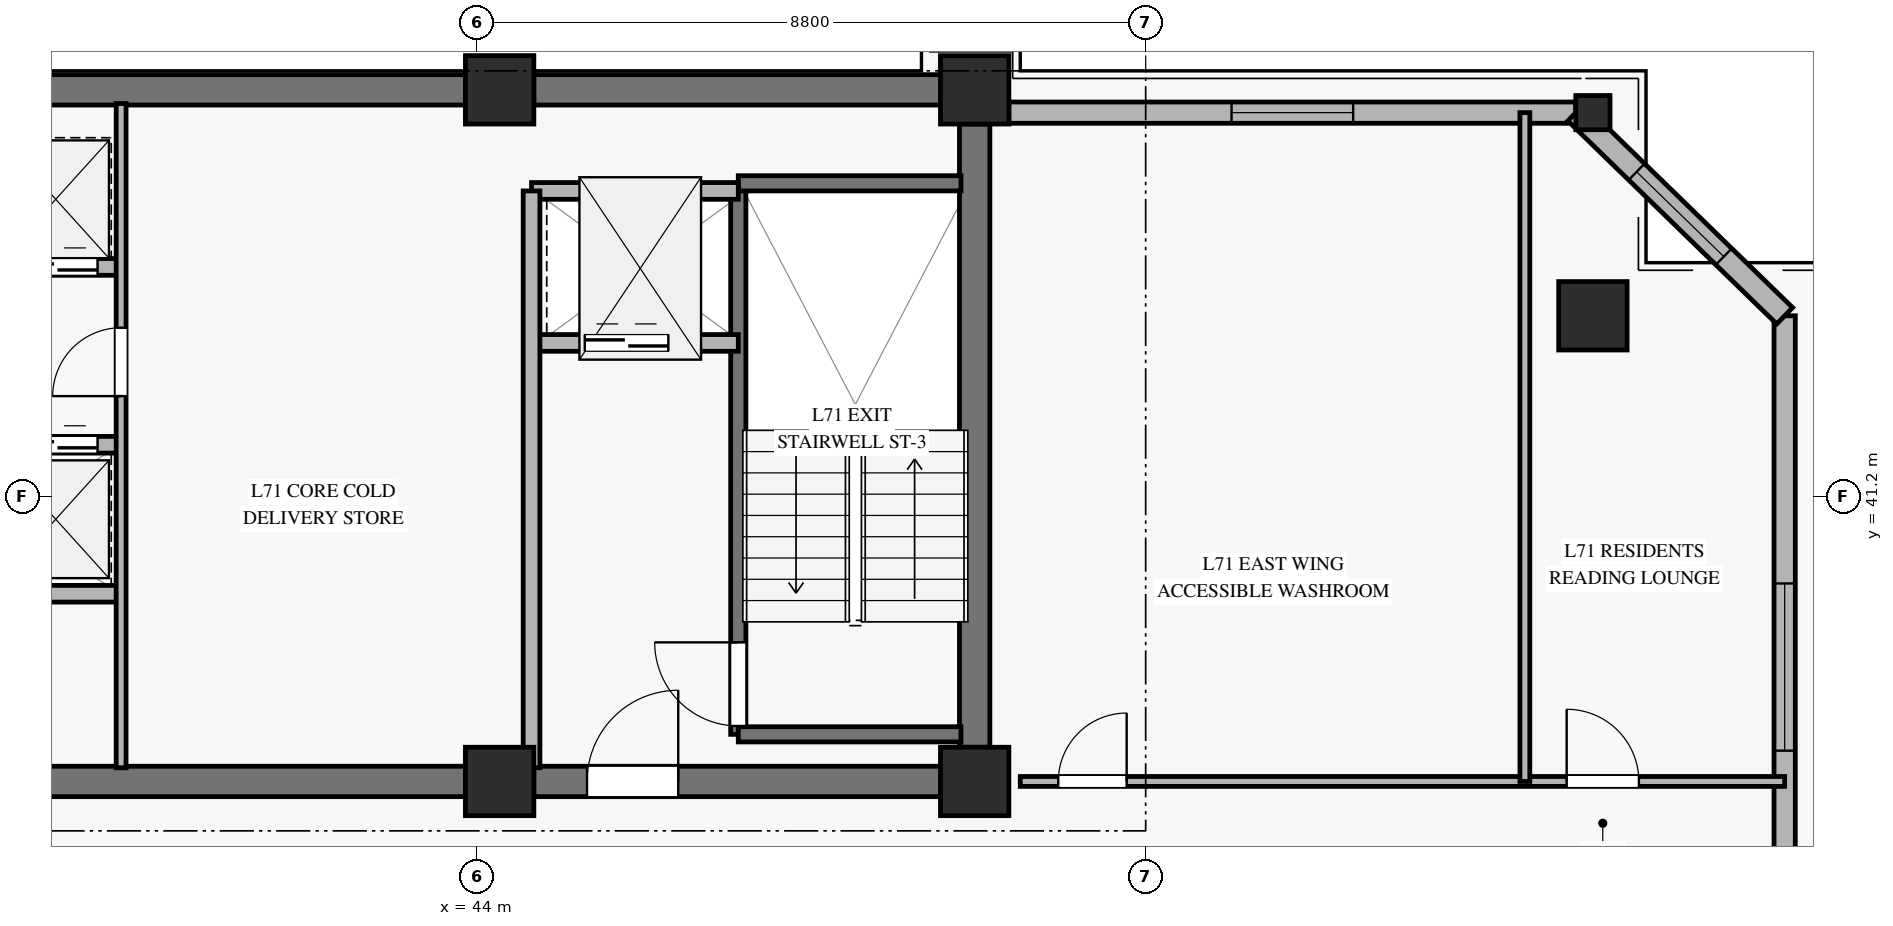
"""IFC4 building model, lengths in metres.
Left out: names, types, materials, properties, quantities, classifications, styles, units other than length and angle.
Written with IfcOpenShell. Run it as: python <this file> out.ifc"""

import sys

from ifc_helpers import new_model, si_unit, direction, frame, frame_2d, origin, origin_2d, place, context, subcontext, project, spatial, rectangle, hollow_rectangle, extrude, source, transform, mapped, element, fill, save


model = new_model("IFC4")
c1 = context("Model", 3, precision=1e-05, world=origin(), true_north=direction((0.0, 1.0)))
c2 = subcontext(c1, "Body", "Model", "MODEL_VIEW")
j1 = project(units=[si_unit("LENGTHUNIT", "METRE"), si_unit("PLANEANGLEUNIT", "RADIAN")], contexts=[c1])
p1 = place(None, origin())
s1 = spatial("IfcSite", under=j1, at=p1, CompositionType="ELEMENT")
p2 = place(p1, origin())
s2 = spatial("IfcBuilding", under=s1, at=p2, CompositionType="ELEMENT")
p3 = place(p2, frame((0.0, 0.0, 275.7)))
s3 = spatial("IfcBuildingStorey", under=s2, at=p3, CompositionType="ELEMENT", Elevation=275.7)
m1 = source(origin(), c2, "Body", "SweptSolid", [
    extrude(rectangle(XDim=0.9, YDim=0.9, at=origin_2d()), origin(), (0.0, 0.0, 1.0), 3.14),
])
for number, where, z_axis, x_axis in (
    (1, (44.3, 37.45, 0.0), (0.0, 0.0, 1.0), (1.0, 0.0, 0.0)),
    (2, (44.3, 46.55, 0.0), (0.0, 0.0, 1.0), (1.0, 0.0, 0.0)),
    (3, (50.55, 37.45, 0.0), (0.0, 0.0, 1.0), (1.0, 0.0, 0.0)),
    (4, (50.55, 46.55, 0.0), (0.0, 0.0, 1.0), (1.0, 0.0, 0.0)),
):
    element("IfcColumn", number, at=place(p3, frame(where, z_axis=z_axis, x_axis=x_axis)), inside=s3, PredefinedType="PILASTER", context=c2, shape_type="MappedRepresentation", body=[
        mapped(m1, transform((0.0, 0.0, 0.0), x_axis=(1.0, 0.0, 0.0), y_axis=(0.0, 1.0, 0.0), z_axis=(0.0, 0.0, 1.0), scale=1.0)),
    ])
p4 = place(p3, frame((36.05, 46.55, 0.0), z_axis=(0.0, 0.0, 1.0), x_axis=(1.0, 0.0, 0.0)))
e5 = element("IfcWall", 5, at=p4, inside=s3, PredefinedType="SHEAR", context=c2, shape_type="SweptSolid", body=[
    extrude(rectangle(XDim=7.8, YDim=0.4, at=frame_2d((3.9, 0.0))), origin(), (0.0, 0.0, 1.0), 3.14),
])
p5 = place(p3, frame((44.75, 46.55, 0.0), z_axis=(0.0, 0.0, 1.0), x_axis=(1.0, 0.0, 0.0)))
e6 = element("IfcWall", 6, at=p5, inside=s3, PredefinedType="SHEAR", context=c2, shape_type="SweptSolid", body=[
    extrude(rectangle(XDim=5.35, YDim=0.4, at=frame_2d((2.675, 0.0))), origin(), (0.0, 0.0, 1.0), 3.14),
])
p6 = place(p3, frame((36.05, 37.45, 0.0), z_axis=(0.0, 0.0, 1.0), x_axis=(1.0, 0.0, 0.0)))
e7 = element("IfcWall", 7, at=p6, inside=s3, PredefinedType="SHEAR", context=c2, shape_type="SweptSolid", body=[
    extrude(rectangle(XDim=7.8, YDim=0.4, at=frame_2d((3.9, 0.0))), origin(), (0.0, 0.0, 1.0), 3.14),
])
p7 = place(p3, frame((44.75, 37.45, 0.0), z_axis=(0.0, 0.0, 1.0), x_axis=(1.0, 0.0, 0.0)))
e8 = element("IfcWall", 8, at=p7, inside=s3, PredefinedType="SHEAR", context=c2, shape_type="SweptSolid", body=[
    extrude(rectangle(XDim=5.35, YDim=0.4, at=frame_2d((2.675, 0.0))), origin(), (0.0, 0.0, 1.0), 3.14),
])
p8 = place(p7, frame((0.7, 0.0, 0.0)))
e9 = element("IfcOpeningElement", 9, at=p8, cuts=e8, PredefinedType="OPENING", context=c2, shape_type="SweptSolid", body=[
    extrude(rectangle(XDim=1.2, YDim=2.15, at=frame_2d((0.6, 1.075))), frame((0.0, 0.21, 0.0), z_axis=(0.0, -1.0, 0.0), x_axis=(1.0, 0.0, 0.0)), (0.0, 0.0, 1.0), 0.42),
])
p9 = place(p3, frame((50.55, 37.9, 0.0), z_axis=(0.0, 0.0, 1.0), x_axis=(0.0, 1.0, 0.0)))
e10 = element("IfcWall", 10, at=p9, inside=s3, PredefinedType="SHEAR", context=c2, shape_type="SweptSolid", body=[
    extrude(rectangle(XDim=8.2, YDim=0.4, at=frame_2d((4.1, 0.0))), origin(), (0.0, 0.0, 1.0), 3.14),
])
m2 = source(origin(), c2, "Body", "SweptSolid", [
    extrude(hollow_rectangle(XDim=0.9, YDim=0.9, WallThickness=0.04, at=origin_2d()), origin(), (0.0, 0.0, 1.0), 3.162),
])
p10 = place(p3, frame((58.684, 43.577, 0.0), z_axis=(-0.117044343461, 0.014283115792, 0.993023974669), x_axis=(-0.121133055189, -0.992636279279, 0.0)))
e11 = element("IfcColumn", 11, at=p10, inside=s3, PredefinedType="COLUMN", context=c2, shape_type="MappedRepresentation", body=[
    mapped(m2, transform((0.0, 0.0, 0.0), x_axis=(1.0, 0.0, 0.0), y_axis=(0.0, 1.0, 0.0), z_axis=(0.0, 0.0, 1.0), scale=1.0)),
])
m3 = source(origin(), c2, "Body", "SweptSolid", [
    extrude(hollow_rectangle(XDim=0.45, YDim=0.45, WallThickness=0.022, at=origin_2d()), origin(), (0.0, 0.0, 1.0), 3.162),
])
p11 = place(p3, frame((58.684, 46.25, 0.0), z_axis=(-0.117056284244, 0.0, 0.993125282288), x_axis=(0.0, -1.0, 0.0)))
e12 = element("IfcColumn", 12, at=p11, inside=s3, PredefinedType="COLUMN", context=c2, shape_type="MappedRepresentation", body=[
    mapped(m3, transform((0.0, 0.0, 0.0), x_axis=(1.0, 0.0, 0.0), y_axis=(0.0, 1.0, 0.0), z_axis=(0.0, 0.0, 1.0), scale=1.0)),
])
p12 = place(p3, frame((61.207, 31.763, 0.0), z_axis=(0.0, 0.0, 1.0), x_axis=(0.0, 1.0, 0.0)))
e13 = element("IfcWall", 13, at=p12, inside=s3, PredefinedType="SOLIDWALL", context=c2, shape_type="SweptSolid", body=[
    extrude(rectangle(XDim=11.814, YDim=0.28, at=frame_2d((5.907, 0.0))), origin(), (0.0, 0.0, 1.0), 2.77),
])
p13 = place(p12, frame((6.092, 0.0, 0.45)))
e14 = element("IfcOpeningElement", 14, at=p13, cuts=e13, PredefinedType="OPENING", context=c2, shape_type="SweptSolid", body=[
    extrude(rectangle(XDim=2.2, YDim=2.1, at=frame_2d((1.1, 1.05))), frame((0.0, 0.15, 0.0), z_axis=(0.0, -1.0, 0.0), x_axis=(1.0, 0.0, 0.0)), (0.0, 0.0, 1.0), 0.3),
])
p14 = place(p3, frame((51.0, 46.25, 0.0), z_axis=(0.0, 0.0, 1.0), x_axis=(1.0, 0.0, 0.0)))
e15 = element("IfcWall", 15, at=p14, inside=s3, PredefinedType="SOLIDWALL", context=c2, shape_type="SweptSolid", body=[
    extrude(rectangle(XDim=7.459, YDim=0.28, at=frame_2d((3.729, 0.0))), origin(), (0.0, 0.0, 1.0), 2.77),
])
p15 = place(p14, frame((2.93, 0.0, 0.45)))
e16 = element("IfcOpeningElement", 16, at=p15, cuts=e15, PredefinedType="OPENING", context=c2, shape_type="SweptSolid", body=[
    extrude(rectangle(XDim=1.6, YDim=2.0, at=frame_2d((0.8, 1.0))), frame((0.0, 0.15, 0.0), z_axis=(0.0, -1.0, 0.0), x_axis=(1.0, 0.0, 0.0)), (0.0, 0.0, 1.0), 0.3),
])
p16 = place(p3, frame((61.207, 43.577, 0.0), z_axis=(0.0, 0.0, 1.0), x_axis=(-0.716814531551, 0.697263886457, 0.0)))
e17 = element("IfcWall", 17, at=p16, inside=s3, PredefinedType="SOLIDWALL", context=c2, shape_type="SweptSolid", body=[
    extrude(rectangle(XDim=3.834, YDim=0.3, at=frame_2d((1.917, 0.0))), origin(), (0.0, 0.0, 1.0), 2.77),
])
p17 = place(p16, frame((1.117, 0.0, 0.45)))
e18 = element("IfcOpeningElement", 18, at=p17, cuts=e17, PredefinedType="OPENING", context=c2, shape_type="SweptSolid", body=[
    extrude(rectangle(XDim=1.6, YDim=2.0, at=frame_2d((0.8, 1.0))), frame((0.0, 0.16, 0.0), z_axis=(0.0, -1.0, 0.0), x_axis=(1.0, 0.0, 0.0)), (0.0, 0.0, 1.0), 0.32),
])
p18 = place(p3, frame((47.44, 38.07, 0.0), z_axis=(0.0, 0.0, 1.0), x_axis=(0.0, 1.0, 0.0)))
e19 = element("IfcWall", 19, at=p18, inside=s3, PredefinedType="SOLIDWALL", context=c2, shape_type="SweptSolid", body=[
    extrude(rectangle(XDim=7.25, YDim=0.2, at=frame_2d((3.625, 0.0))), origin(), (0.0, 0.0, 1.0), 3.4),
])
p19 = place(p18, frame((0.11, 0.0, 0.0)))
e20 = element("IfcOpeningElement", 20, at=p19, cuts=e19, PredefinedType="OPENING", context=c2, shape_type="SweptSolid", body=[
    extrude(rectangle(XDim=1.1, YDim=2.15, at=frame_2d((0.55, 1.075))), frame((0.0, 0.11, 0.0), z_axis=(0.0, -1.0, 0.0), x_axis=(1.0, 0.0, 0.0)), (0.0, 0.0, 1.0), 0.22),
])
for number, where, z_axis, x_axis in (
    (21, (47.44, 45.32, 0.0), (0.0, 0.0, 1.0), (1.0, 0.0, 0.0)),
    (22, (47.44, 38.07, 0.0), (0.0, 0.0, 1.0), (1.0, 0.0, 0.0)),
):
    element("IfcWall", number, at=place(p3, frame(where, z_axis=z_axis, x_axis=x_axis)), inside=s3, PredefinedType="SOLIDWALL", context=c2, shape_type="SweptSolid", body=[
        extrude(rectangle(XDim=2.93, YDim=0.2, at=frame_2d((1.465, 0.0))), origin(), (0.0, 0.0, 1.0), 3.4),
    ])
p20 = place(p3, frame((44.72, 43.22, 0.0), z_axis=(0.0, 0.0, 1.0), x_axis=(1.0, 0.0, 0.0)))
e23 = element("IfcWall", 23, at=p20, inside=s3, PredefinedType="SOLIDWALL", context=c2, shape_type="SweptSolid", body=[
    extrude(rectangle(XDim=2.72, YDim=0.22, at=frame_2d((1.36, 0.0))), origin(), (0.0, 0.0, 1.0), 3.14),
])
p21 = place(p20, frame((0.7, 0.0, 0.0)))
e24 = element("IfcOpeningElement", 24, at=p21, cuts=e23, PredefinedType="OPENING", context=c2, shape_type="SweptSolid", body=[
    extrude(rectangle(XDim=1.1, YDim=2.2, at=frame_2d((0.55, 1.1))), frame((0.0, 0.12, 0.0), z_axis=(0.0, -1.0, 0.0), x_axis=(1.0, 0.0, 0.0)), (0.0, 0.0, 1.0), 0.24),
])
p22 = place(p3, frame((44.72, 45.22, 0.0), z_axis=(0.0, 0.0, 1.0), x_axis=(1.0, 0.0, 0.0)))
e25 = element("IfcWall", 25, at=p22, inside=s3, PredefinedType="SOLIDWALL", context=c2, shape_type="SweptSolid", body=[
    extrude(rectangle(XDim=2.72, YDim=0.22, at=frame_2d((1.36, 0.0))), origin(), (0.0, 0.0, 1.0), 3.14),
])
p23 = place(p3, frame((44.72, 37.63, 0.0), z_axis=(0.0, 0.0, 1.0), x_axis=(0.0, 1.0, 0.0)))
e26 = element("IfcWall", 26, at=p23, inside=s3, PredefinedType="SOLIDWALL", context=c2, shape_type="SweptSolid", body=[
    extrude(rectangle(XDim=7.59, YDim=0.22, at=frame_2d((3.795, 0.0))), origin(), (0.0, 0.0, 1.0), 3.14),
])
p24 = place(p3, frame((36.12, 44.22, 0.0), z_axis=(0.0, 0.0, 1.0), x_axis=(1.0, 0.0, 0.0)))
e27 = element("IfcWall", 27, at=p24, inside=s3, PredefinedType="SOLIDWALL", context=c2, shape_type="SweptSolid", body=[
    extrude(rectangle(XDim=3.2, YDim=0.22, at=frame_2d((1.6, 0.0))), origin(), (0.0, 0.0, 1.0), 3.14),
])
p25 = place(p24, frame((0.3, 0.0, 0.0)))
e28 = element("IfcOpeningElement", 28, at=p25, cuts=e27, PredefinedType="OPENING", context=c2, shape_type="SweptSolid", body=[
    extrude(rectangle(XDim=1.1, YDim=2.2, at=frame_2d((0.55, 1.1))), frame((0.0, 0.12, 0.0), z_axis=(0.0, -1.0, 0.0), x_axis=(1.0, 0.0, 0.0)), (0.0, 0.0, 1.0), 0.24),
])
p26 = place(p24, frame((1.79, 0.0, 0.0)))
e29 = element("IfcOpeningElement", 29, at=p26, cuts=e27, PredefinedType="OPENING", context=c2, shape_type="SweptSolid", body=[
    extrude(rectangle(XDim=1.1, YDim=2.2, at=frame_2d((0.55, 1.1))), frame((0.0, 0.12, 0.0), z_axis=(0.0, -1.0, 0.0), x_axis=(1.0, 0.0, 0.0)), (0.0, 0.0, 1.0), 0.24),
])
p27 = place(p3, frame((36.12, 41.88, 0.0), z_axis=(0.0, 0.0, 1.0), x_axis=(1.0, 0.0, 0.0)))
e30 = element("IfcWall", 30, at=p27, inside=s3, PredefinedType="SOLIDWALL", context=c2, shape_type="SweptSolid", body=[
    extrude(rectangle(XDim=3.2, YDim=0.22, at=frame_2d((1.6, 0.0))), origin(), (0.0, 0.0, 1.0), 3.14),
])
p28 = place(p27, frame((0.3, 0.0, 0.0)))
e31 = element("IfcOpeningElement", 31, at=p28, cuts=e30, PredefinedType="OPENING", context=c2, shape_type="SweptSolid", body=[
    extrude(rectangle(XDim=1.1, YDim=2.2, at=frame_2d((0.55, 1.1))), frame((0.0, 0.12, 0.0), z_axis=(0.0, -1.0, 0.0), x_axis=(1.0, 0.0, 0.0)), (0.0, 0.0, 1.0), 0.24),
])
p29 = place(p27, frame((1.79, 0.0, 0.0)))
e32 = element("IfcOpeningElement", 32, at=p29, cuts=e30, PredefinedType="OPENING", context=c2, shape_type="SweptSolid", body=[
    extrude(rectangle(XDim=1.1, YDim=2.2, at=frame_2d((0.55, 1.1))), frame((0.0, 0.12, 0.0), z_axis=(0.0, -1.0, 0.0), x_axis=(1.0, 0.0, 0.0)), (0.0, 0.0, 1.0), 0.24),
])
p30 = place(p3, frame((36.12, 39.92, 0.0), z_axis=(0.0, 0.0, 1.0), x_axis=(1.0, 0.0, 0.0)))
e33 = element("IfcWall", 33, at=p30, inside=s3, PredefinedType="SOLIDWALL", context=c2, shape_type="SweptSolid", body=[
    extrude(rectangle(XDim=3.2, YDim=0.22, at=frame_2d((1.6, 0.0))), origin(), (0.0, 0.0, 1.0), 3.14),
])
p31 = place(p3, frame((39.32, 37.63, 0.0), z_axis=(0.0, 0.0, 1.0), x_axis=(0.0, 1.0, 0.0)))
e34 = element("IfcWall", 34, at=p31, inside=s3, PredefinedType="PARTITIONING", context=c2, shape_type="SweptSolid", body=[
    extrude(rectangle(XDim=8.74, YDim=0.13, at=frame_2d((4.37, 0.0))), origin(), (0.0, 0.0, 1.0), 3.14),
])
p32 = place(p31, frame((4.89, 0.0, 0.0)))
e35 = element("IfcOpeningElement", 35, at=p32, cuts=e34, PredefinedType="OPENING", context=c2, shape_type="SweptSolid", body=[
    extrude(rectangle(XDim=0.9, YDim=2.1, at=frame_2d((0.45, 1.05))), frame((0.0, 0.075, 0.0), z_axis=(0.0, -1.0, 0.0), x_axis=(1.0, 0.0, 0.0)), (0.0, 0.0, 1.0), 0.15),
])
p33 = place(p3, frame((51.15, 37.45, 0.0), z_axis=(0.0, 0.0, 1.0), x_axis=(1.0, 0.0, 0.0)))
e36 = element("IfcWall", 36, at=p33, inside=s3, PredefinedType="PARTITIONING", context=c2, shape_type="SweptSolid", body=[
    extrude(rectangle(XDim=10.057, YDim=0.13, at=frame_2d((5.029, 0.0))), origin(), (0.0, 0.0, 1.0), 2.775),
])
p34 = place(p33, frame((0.5, 0.0, 0.0)))
e37 = element("IfcOpeningElement", 37, at=p34, cuts=e36, PredefinedType="OPENING", context=c2, shape_type="SweptSolid", body=[
    extrude(rectangle(XDim=0.9, YDim=2.1, at=frame_2d((0.45, 1.05))), frame((0.0, 0.075, 0.0), z_axis=(0.0, -1.0, 0.0), x_axis=(1.0, 0.0, 0.0)), (0.0, 0.0, 1.0), 0.15),
])
p35 = place(p33, frame((7.189, 0.0, 0.0)))
e38 = element("IfcOpeningElement", 38, at=p35, cuts=e36, PredefinedType="OPENING", context=c2, shape_type="SweptSolid", body=[
    extrude(rectangle(XDim=0.95, YDim=2.1, at=frame_2d((0.475, 1.05))), frame((0.0, 0.075, 0.0), z_axis=(0.0, -1.0, 0.0), x_axis=(1.0, 0.0, 0.0)), (0.0, 0.0, 1.0), 0.15),
])
p36 = place(p3, frame((57.789, 37.45, 0.0), z_axis=(0.0, 0.0, 1.0), x_axis=(0.0, 1.0, 0.0)))
e39 = element("IfcWall", 39, at=p36, inside=s3, PredefinedType="PARTITIONING", context=c2, shape_type="SweptSolid", body=[
    extrude(rectangle(XDim=8.8, YDim=0.13, at=frame_2d((4.4, 0.0))), origin(), (0.0, 0.0, 1.0), 3.14),
])
m4 = source(origin(), c2, "Body", "SweptSolid", [
    extrude(rectangle(XDim=2.2, YDim=2.1, at=frame_2d((1.1, 1.05))), frame((0.0, 0.03, 0.0), z_axis=(0.0, -1.0, 0.0), x_axis=(1.0, 0.0, 0.0)), (0.0, 0.0, 1.0), 0.06),
])
p37 = place(p13, origin())
e40 = element("IfcWindow", 40, at=p37, inside=s3, PartitioningType="SINGLE_PANEL", PredefinedType="WINDOW", context=c2, shape_type="MappedRepresentation", body=[
    mapped(m4, transform((0.0, 0.0, 0.0), x_axis=(1.0, 0.0, 0.0), y_axis=(0.0, 1.0, 0.0), z_axis=(0.0, 0.0, 1.0), scale=1.0)),
])
fill(e14, e40)
m5 = source(origin(), c2, "Body", "SweptSolid", [
    extrude(rectangle(XDim=1.6, YDim=2.0, at=frame_2d((0.8, 1.0))), frame((0.0, 0.03, 0.0), z_axis=(0.0, -1.0, 0.0), x_axis=(1.0, 0.0, 0.0)), (0.0, 0.0, 1.0), 0.06),
])
p38 = place(p15, origin())
e41 = element("IfcWindow", 41, at=p38, inside=s3, PartitioningType="SINGLE_PANEL", PredefinedType="WINDOW", context=c2, shape_type="MappedRepresentation", body=[
    mapped(m5, transform((0.0, 0.0, 0.0), x_axis=(1.0, 0.0, 0.0), y_axis=(0.0, 1.0, 0.0), z_axis=(0.0, 0.0, 1.0), scale=1.0)),
])
fill(e16, e41)
p39 = place(p17, origin())
e42 = element("IfcWindow", 42, at=p39, inside=s3, PartitioningType="SINGLE_PANEL", PredefinedType="WINDOW", context=c2, shape_type="MappedRepresentation", body=[
    mapped(m5, transform((0.0, 0.0, 0.0), x_axis=(1.0, 0.0, 0.0), y_axis=(0.0, 1.0, 0.0), z_axis=(0.0, 0.0, 1.0), scale=1.0)),
])
fill(e18, e42)
m6 = source(origin(), c2, "Body", "SweptSolid", [
    extrude(rectangle(XDim=1.1, YDim=2.15, at=frame_2d((0.55, 1.075))), frame((0.0, 0.025, 0.0), z_axis=(0.0, -1.0, 0.0), x_axis=(1.0, 0.0, 0.0)), (0.0, 0.0, 1.0), 0.05),
])
p40 = place(p19, origin())
e43 = element("IfcDoor", 43, at=p40, inside=s3, OperationType="SINGLE_SWING_RIGHT", PredefinedType="DOOR", context=c2, shape_type="MappedRepresentation", body=[
    mapped(m6, transform((0.0, 0.0, 0.0), x_axis=(1.0, 0.0, 0.0), y_axis=(0.0, 1.0, 0.0), z_axis=(0.0, 0.0, 1.0), scale=1.0)),
])
fill(e20, e43)
m7 = source(origin(), c2, "Body", "SweptSolid", [
    extrude(rectangle(XDim=1.1, YDim=2.2, at=frame_2d((0.55, 1.1))), frame((0.0, 0.025, 0.0), z_axis=(0.0, -1.0, 0.0), x_axis=(1.0, 0.0, 0.0)), (0.0, 0.0, 1.0), 0.05),
])
p41 = place(p21, origin())
e44 = element("IfcDoor", 44, at=p41, inside=s3, OperationType="SLIDING_TO_LEFT", PredefinedType="DOOR", context=c2, shape_type="MappedRepresentation", body=[
    mapped(m7, transform((0.0, 0.0, 0.0), x_axis=(1.0, 0.0, 0.0), y_axis=(0.0, 1.0, 0.0), z_axis=(0.0, 0.0, 1.0), scale=1.0)),
])
fill(e24, e44)
m8 = source(origin(), c2, "Body", "SweptSolid", [
    extrude(rectangle(XDim=1.2, YDim=2.15, at=frame_2d((0.6, 1.075))), frame((0.0, 0.025, 0.0), z_axis=(0.0, -1.0, 0.0), x_axis=(1.0, 0.0, 0.0)), (0.0, 0.0, 1.0), 0.05),
])
p42 = place(p8, origin())
e45 = element("IfcDoor", 45, at=p42, inside=s3, OperationType="SINGLE_SWING_RIGHT", PredefinedType="DOOR", context=c2, shape_type="MappedRepresentation", body=[
    mapped(m8, transform((0.0, 0.0, 0.0), x_axis=(1.0, 0.0, 0.0), y_axis=(0.0, 1.0, 0.0), z_axis=(0.0, 0.0, 1.0), scale=1.0)),
])
fill(e9, e45)
p43 = place(p26, origin())
e46 = element("IfcDoor", 46, at=p43, inside=s3, OperationType="SLIDING_TO_LEFT", PredefinedType="DOOR", context=c2, shape_type="MappedRepresentation", body=[
    mapped(m7, transform((0.0, 0.0, 0.0), x_axis=(1.0, 0.0, 0.0), y_axis=(0.0, 1.0, 0.0), z_axis=(0.0, 0.0, 1.0), scale=1.0)),
])
fill(e29, e46)
p44 = place(p29, origin())
e47 = element("IfcDoor", 47, at=p44, inside=s3, OperationType="SLIDING_TO_LEFT", PredefinedType="DOOR", context=c2, shape_type="MappedRepresentation", body=[
    mapped(m7, transform((0.0, 0.0, 0.0), x_axis=(1.0, 0.0, 0.0), y_axis=(0.0, 1.0, 0.0), z_axis=(0.0, 0.0, 1.0), scale=1.0)),
])
fill(e32, e47)
m9 = source(origin(), c2, "Body", "SweptSolid", [
    extrude(rectangle(XDim=0.9, YDim=2.1, at=frame_2d((0.45, 1.05))), frame((0.0, 0.025, 0.0), z_axis=(0.0, -1.0, 0.0), x_axis=(1.0, 0.0, 0.0)), (0.0, 0.0, 1.0), 0.05),
])
p45 = place(p32, origin())
e48 = element("IfcDoor", 48, at=p45, inside=s3, OperationType="SINGLE_SWING_LEFT", PredefinedType="DOOR", context=c2, shape_type="MappedRepresentation", body=[
    mapped(m9, transform((0.0, 0.0, 0.0), x_axis=(1.0, 0.0, 0.0), y_axis=(0.0, 1.0, 0.0), z_axis=(0.0, 0.0, 1.0), scale=1.0)),
])
fill(e35, e48)
p46 = place(p34, origin())
e49 = element("IfcDoor", 49, at=p46, inside=s3, OperationType="SINGLE_SWING_RIGHT", PredefinedType="DOOR", context=c2, shape_type="MappedRepresentation", body=[
    mapped(m9, transform((0.0, 0.0, 0.0), x_axis=(1.0, 0.0, 0.0), y_axis=(0.0, 1.0, 0.0), z_axis=(0.0, 0.0, 1.0), scale=1.0)),
])
fill(e37, e49)
m10 = source(origin(), c2, "Body", "SweptSolid", [
    extrude(rectangle(XDim=0.95, YDim=2.1, at=frame_2d((0.475, 1.05))), frame((0.0, 0.025, 0.0), z_axis=(0.0, -1.0, 0.0), x_axis=(1.0, 0.0, 0.0)), (0.0, 0.0, 1.0), 0.05),
])
p47 = place(p35, origin())
e50 = element("IfcDoor", 50, at=p47, inside=s3, OperationType="SINGLE_SWING_LEFT", PredefinedType="DOOR", context=c2, shape_type="MappedRepresentation", body=[
    mapped(m10, transform((0.0, 0.0, 0.0), x_axis=(1.0, 0.0, 0.0), y_axis=(0.0, 1.0, 0.0), z_axis=(0.0, 0.0, 1.0), scale=1.0)),
])
fill(e38, e50)
save(model, sys.argv[1])
